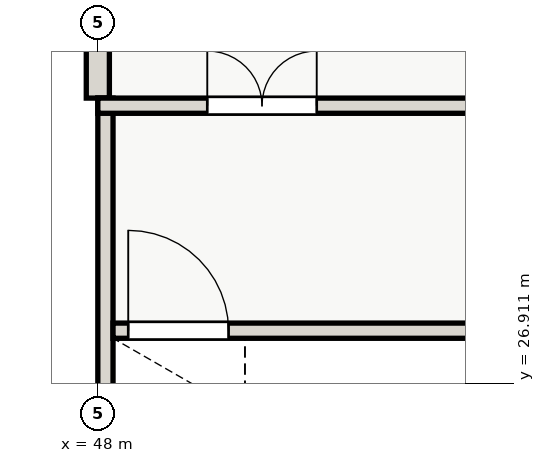
"""IFC4 building model, lengths in metres.
Left out: names, types, materials, properties, quantities, classifications, styles, units other than length and angle.
Written with IfcOpenShell. Run it as: python <this file> out.ifc"""

import sys

from ifc_helpers import new_model, si_unit, direction, frame, frame_2d, origin, place, context, subcontext, project, spatial, rectangle, extrude, element, fill, save


model = new_model("IFC4")
c1 = context("Model", 3, precision=1e-05, world=origin(), true_north=direction((0.0, 1.0)))
c2 = subcontext(c1, "Body", "Model", "MODEL_VIEW")
j1 = project(units=[si_unit("LENGTHUNIT", "METRE"), si_unit("PLANEANGLEUNIT", "RADIAN")], contexts=[c1])
p1 = place(None, origin())
s1 = spatial("IfcSite", under=j1, at=p1, CompositionType="ELEMENT")
p2 = place(p1, origin())
s2 = spatial("IfcBuilding", under=s1, at=p2, CompositionType="ELEMENT")
p3 = place(p2, frame((0.0, 0.0, 8.4)))
s3 = spatial("IfcBuildingStorey", under=s2, at=p3, CompositionType="ELEMENT", Elevation=8.4)
p4 = place(p3, frame((48.0, 31.6, 0.0), z_axis=(0.0, 0.0, 1.0), x_axis=(0.0, 1.0, 0.0)))
e1 = element("IfcWall", 1, at=p4, inside=s3, PredefinedType="SOLIDWALL", context=c2, shape_type="SweptSolid", body=[
    extrude(rectangle(XDim=4.4, YDim=0.38, at=frame_2d((2.2, 0.0))), origin(), (0.0, 0.0, 1.0), 3.48),
])
p5 = place(p3, frame((48.125, 22.4, 0.0), z_axis=(0.0, 0.0, 1.0), x_axis=(0.0, 1.0, 0.0)))
e2 = element("IfcWall", 2, at=p5, inside=s3, PredefinedType="SHEAR", context=c2, shape_type="SweptSolid", body=[
    extrude(rectangle(XDim=9.2, YDim=0.25, at=frame_2d((4.6, 0.0))), origin(), (0.0, 0.0, 1.0), 4.2),
])
p6 = place(p3, frame((48.0, 31.475, 0.0), z_axis=(0.0, 0.0, 1.0), x_axis=(1.0, 0.0, 0.0)))
e3 = element("IfcWall", 3, at=p6, inside=s3, PredefinedType="SHEAR", context=c2, shape_type="SweptSolid", body=[
    extrude(rectangle(XDim=9.2, YDim=0.25, at=frame_2d((4.6, 0.0))), origin(), (0.0, 0.0, 1.0), 4.2),
])
p7 = place(p6, frame((1.8, 0.0, 0.0)))
e4 = element("IfcOpeningElement", 4, at=p7, cuts=e3, PredefinedType="OPENING", context=c2, shape_type="SweptSolid", body=[
    extrude(rectangle(XDim=1.8, YDim=2.15, at=frame_2d((0.9, 1.075))), frame((0.0, 0.135, 0.0), z_axis=(0.0, -1.0, 0.0), x_axis=(1.0, 0.0, 0.0)), (0.0, 0.0, 1.0), 0.27),
])
p8 = place(p3, frame((48.25, 27.775, 0.0), z_axis=(0.0, 0.0, 1.0), x_axis=(1.0, 0.0, 0.0)))
e5 = element("IfcWall", 5, at=p8, inside=s3, PredefinedType="SHEAR", context=c2, shape_type="SweptSolid", body=[
    extrude(rectangle(XDim=8.7, YDim=0.25, at=frame_2d((4.35, 0.0))), origin(), (0.0, 0.0, 1.0), 4.2),
])
p9 = place(p8, frame((0.25, 0.0, 0.0)))
e6 = element("IfcOpeningElement", 6, at=p9, cuts=e5, PredefinedType="OPENING", context=c2, shape_type="SweptSolid", body=[
    extrude(rectangle(XDim=1.65, YDim=2.1, at=frame_2d((0.825, 1.05))), frame((0.0, 0.135, 0.0), z_axis=(0.0, -1.0, 0.0), x_axis=(1.0, 0.0, 0.0)), (0.0, 0.0, 1.0), 0.27),
])
p10 = place(p7, origin())
e7 = element("IfcDoor", 7, at=p10, inside=s3, OperationType="DOUBLE_DOOR_SINGLE_SWING", PredefinedType="DOOR", context=c2, shape_type="SweptSolid", body=[
    extrude(rectangle(XDim=1.8, YDim=2.15, at=frame_2d((0.9, 1.075))), frame((0.0, 0.025, 0.0), z_axis=(0.0, -1.0, 0.0), x_axis=(1.0, 0.0, 0.0)), (0.0, 0.0, 1.0), 0.05),
])
fill(e4, e7)
p11 = place(p9, origin())
e8 = element("IfcDoor", 8, at=p11, inside=s3, OperationType="SINGLE_SWING_LEFT", PredefinedType="DOOR", context=c2, shape_type="SweptSolid", body=[
    extrude(rectangle(XDim=1.65, YDim=2.1, at=frame_2d((0.825, 1.05))), frame((0.0, 0.025, 0.0), z_axis=(0.0, -1.0, 0.0), x_axis=(1.0, 0.0, 0.0)), (0.0, 0.0, 1.0), 0.05),
])
fill(e6, e8)
save(model, sys.argv[1])
